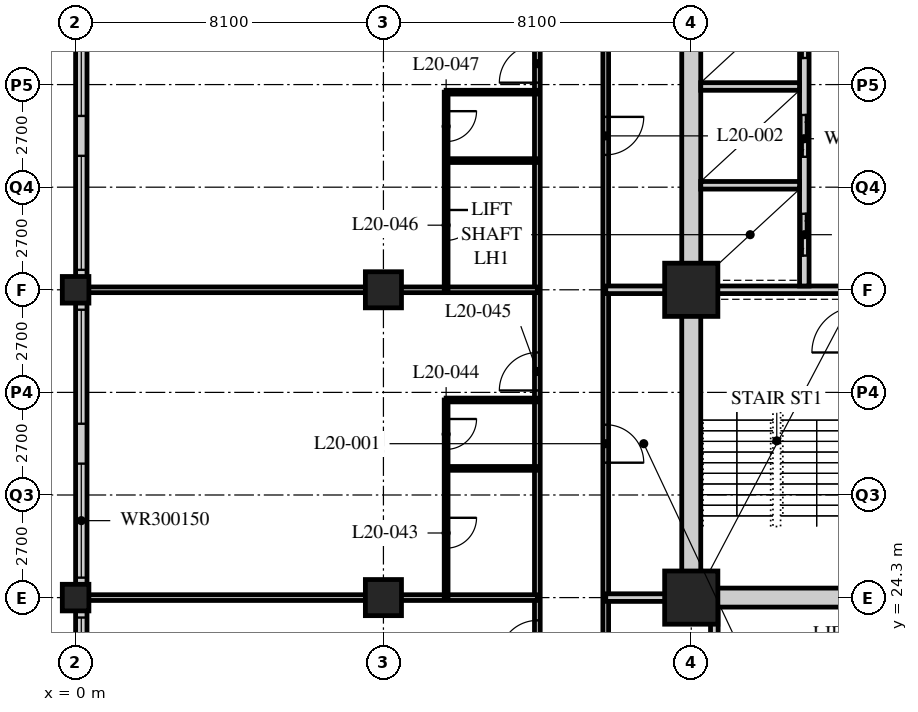
"""IFC4 building model, lengths in metres.
Left out: names, types, materials, properties, quantities, classifications, styles, units other than length and angle.
Written with IfcOpenShell. Run it as: python <this file> out.ifc"""

import sys

from ifc_helpers import new_model, si_unit, direction, frame, frame_2d, origin, origin_2d, place, context, subcontext, project, spatial, rectangle, hollow_rectangle, extrude, element, fill, save


model = new_model("IFC4")
c1 = context("Model", 3, precision=1e-05, world=origin(), true_north=direction((0.0, 1.0)))
c2 = subcontext(c1, "Body", "Model", "MODEL_VIEW")
j1 = project(units=[si_unit("LENGTHUNIT", "METRE"), si_unit("PLANEANGLEUNIT", "RADIAN")], contexts=[c1])
p1 = place(None, origin())
s1 = spatial("IfcSite", under=j1, at=p1, CompositionType="ELEMENT")
p2 = place(p1, origin())
s2 = spatial("IfcBuilding", under=s1, at=p2, CompositionType="ELEMENT")
p3 = place(p2, frame((0.0, 0.0, 80.6)))
s3 = spatial("IfcBuildingStorey", under=s2, at=p3, CompositionType="ELEMENT", Elevation=80.6)
for number, where, z_axis, x_axis in (
    (1, (0.0, 24.3, 0.0), (0.0, 0.0, 1.0), (1.0, 0.0, 0.0)),
    (2, (0.0, 32.4, 0.0), (0.0, 0.0, 1.0), (1.0, 0.0, 0.0)),
):
    element("IfcColumn", number, at=place(p3, frame(where, z_axis=z_axis, x_axis=x_axis)), inside=s3, PredefinedType="COLUMN", context=c2, shape_type="SweptSolid", body=[
        extrude(hollow_rectangle(XDim=0.7, YDim=0.7, WallThickness=0.06, at=origin_2d()), origin(), (0.0, 0.0, 1.0), 3.4),
    ])
for number, where, z_axis, x_axis in (
    (3, (8.1, 24.3, 0.0), (0.0, 0.0, 1.0), (1.0, 0.0, 0.0)),
    (4, (8.1, 32.4, 0.0), (0.0, 0.0, 1.0), (1.0, 0.0, 0.0)),
):
    element("IfcColumn", number, at=place(p3, frame(where, z_axis=z_axis, x_axis=x_axis)), inside=s3, PredefinedType="COLUMN", context=c2, shape_type="SweptSolid", body=[
        extrude(hollow_rectangle(XDim=0.95, YDim=0.95, WallThickness=0.095, at=origin_2d()), origin(), (0.0, 0.0, 1.0), 3.4),
    ])
for number, where, z_axis, x_axis in (
    (5, (16.2, 24.3, 0.0), (0.0, 0.0, 1.0), (1.0, 0.0, 0.0)),
    (6, (16.2, 32.4, 0.0), (0.0, 0.0, 1.0), (1.0, 0.0, 0.0)),
):
    element("IfcColumn", number, at=place(p3, frame(where, z_axis=z_axis, x_axis=x_axis)), inside=s3, PredefinedType="COLUMN", context=c2, shape_type="SweptSolid", body=[
        extrude(hollow_rectangle(XDim=1.4, YDim=1.4, WallThickness=0.12, at=origin_2d()), origin(), (0.0, 0.0, 1.0), 3.4),
    ])
p4 = place(p3, frame((0.15, 40.2, 0.0), z_axis=(0.0, 0.0, 1.0), x_axis=(0.0, -1.0, 0.0)))
e7 = element("IfcWall", 7, at=p4, inside=s3, PredefinedType="SOLIDWALL", context=c2, shape_type="SweptSolid", body=[
    extrude(rectangle(XDim=32.1, YDim=0.3, at=frame_2d((16.05, 0.0))), origin(), (0.0, 0.0, 1.0), 3.19),
])
p5 = place(p4, frame((0.225, 0.0, 0.9)))
e8 = element("IfcOpeningElement", 8, at=p5, cuts=e7, PredefinedType="OPENING", context=c2, shape_type="SweptSolid", body=[
    extrude(rectangle(XDim=3.0, YDim=1.5, at=frame_2d((1.5, 0.75))), frame((0.0, 0.16, 0.0), z_axis=(0.0, -1.0, 0.0), x_axis=(1.0, 0.0, 0.0)), (0.0, 0.0, 1.0), 0.32),
])
p6 = place(p4, frame((4.275, 0.0, 0.9)))
e9 = element("IfcOpeningElement", 9, at=p6, cuts=e7, PredefinedType="OPENING", context=c2, shape_type="SweptSolid", body=[
    extrude(rectangle(XDim=3.0, YDim=1.5, at=frame_2d((1.5, 0.75))), frame((0.0, 0.16, 0.0), z_axis=(0.0, -1.0, 0.0), x_axis=(1.0, 0.0, 0.0)), (0.0, 0.0, 1.0), 0.32),
])
p7 = place(p4, frame((8.325, 0.0, 0.9)))
e10 = element("IfcOpeningElement", 10, at=p7, cuts=e7, PredefinedType="OPENING", context=c2, shape_type="SweptSolid", body=[
    extrude(rectangle(XDim=3.0, YDim=1.5, at=frame_2d((1.5, 0.75))), frame((0.0, 0.16, 0.0), z_axis=(0.0, -1.0, 0.0), x_axis=(1.0, 0.0, 0.0)), (0.0, 0.0, 1.0), 0.32),
])
p8 = place(p4, frame((12.375, 0.0, 0.9)))
e11 = element("IfcOpeningElement", 11, at=p8, cuts=e7, PredefinedType="OPENING", context=c2, shape_type="SweptSolid", body=[
    extrude(rectangle(XDim=3.0, YDim=1.5, at=frame_2d((1.5, 0.75))), frame((0.0, 0.16, 0.0), z_axis=(0.0, -1.0, 0.0), x_axis=(1.0, 0.0, 0.0)), (0.0, 0.0, 1.0), 0.32),
])
p9 = place(p4, frame((16.425, 0.0, 0.9)))
e12 = element("IfcOpeningElement", 12, at=p9, cuts=e7, PredefinedType="OPENING", context=c2, shape_type="SweptSolid", body=[
    extrude(rectangle(XDim=3.0, YDim=1.5, at=frame_2d((1.5, 0.75))), frame((0.0, 0.16, 0.0), z_axis=(0.0, -1.0, 0.0), x_axis=(1.0, 0.0, 0.0)), (0.0, 0.0, 1.0), 0.32),
])
p10 = place(p4, frame((20.475, 0.0, 0.9)))
e13 = element("IfcOpeningElement", 13, at=p10, cuts=e7, PredefinedType="OPENING", context=c2, shape_type="SweptSolid", body=[
    extrude(rectangle(XDim=3.0, YDim=1.5, at=frame_2d((1.5, 0.75))), frame((0.0, 0.16, 0.0), z_axis=(0.0, -1.0, 0.0), x_axis=(1.0, 0.0, 0.0)), (0.0, 0.0, 1.0), 0.32),
])
p11 = place(p4, frame((24.525, 0.0, 0.9)))
e14 = element("IfcOpeningElement", 14, at=p11, cuts=e7, PredefinedType="OPENING", context=c2, shape_type="SweptSolid", body=[
    extrude(rectangle(XDim=3.0, YDim=1.5, at=frame_2d((1.5, 0.75))), frame((0.0, 0.16, 0.0), z_axis=(0.0, -1.0, 0.0), x_axis=(1.0, 0.0, 0.0)), (0.0, 0.0, 1.0), 0.32),
])
p12 = place(p4, frame((28.575, 0.0, 0.9)))
e15 = element("IfcOpeningElement", 15, at=p12, cuts=e7, PredefinedType="OPENING", context=c2, shape_type="SweptSolid", body=[
    extrude(rectangle(XDim=3.0, YDim=1.5, at=frame_2d((1.5, 0.75))), frame((0.0, 0.16, 0.0), z_axis=(0.0, -1.0, 0.0), x_axis=(1.0, 0.0, 0.0)), (0.0, 0.0, 1.0), 0.32),
])
p13 = place(p3, frame((12.15, 16.2, 0.0), z_axis=(0.0, 0.0, 1.0), x_axis=(0.0, 1.0, 0.0)))
e16 = element("IfcWall", 16, at=p13, inside=s3, PredefinedType="PARTITIONING", context=c2, shape_type="SweptSolid", body=[
    extrude(rectangle(XDim=26.1, YDim=0.15, at=frame_2d((13.05, 0.0))), origin(), (0.0, 0.0, 1.0), 3.19),
])
p14 = place(p13, frame((0.3, 0.0, 0.0)))
e17 = element("IfcOpeningElement", 17, at=p14, cuts=e16, PredefinedType="OPENING", context=c2, shape_type="SweptSolid", body=[
    extrude(rectangle(XDim=1.0, YDim=2.1, at=frame_2d((0.5, 1.05))), frame((0.0, 0.085, 0.0), z_axis=(0.0, -1.0, 0.0), x_axis=(1.0, 0.0, 0.0)), (0.0, 0.0, 1.0), 0.17),
])
p15 = place(p13, frame((6.5, 0.0, 0.0)))
e18 = element("IfcOpeningElement", 18, at=p15, cuts=e16, PredefinedType="OPENING", context=c2, shape_type="SweptSolid", body=[
    extrude(rectangle(XDim=1.0, YDim=2.1, at=frame_2d((0.5, 1.05))), frame((0.0, 0.085, 0.0), z_axis=(0.0, -1.0, 0.0), x_axis=(1.0, 0.0, 0.0)), (0.0, 0.0, 1.0), 0.17),
])
p16 = place(p13, frame((13.55, 0.0, 0.0)))
e19 = element("IfcOpeningElement", 19, at=p16, cuts=e16, PredefinedType="OPENING", context=c2, shape_type="SweptSolid", body=[
    extrude(rectangle(XDim=1.0, YDim=2.1, at=frame_2d((0.5, 1.05))), frame((0.0, 0.085, 0.0), z_axis=(0.0, -1.0, 0.0), x_axis=(1.0, 0.0, 0.0)), (0.0, 0.0, 1.0), 0.17),
])
p17 = place(p13, frame((21.65, 0.0, 0.0)))
e20 = element("IfcOpeningElement", 20, at=p17, cuts=e16, PredefinedType="OPENING", context=c2, shape_type="SweptSolid", body=[
    extrude(rectangle(XDim=1.0, YDim=2.1, at=frame_2d((0.5, 1.05))), frame((0.0, 0.085, 0.0), z_axis=(0.0, -1.0, 0.0), x_axis=(1.0, 0.0, 0.0)), (0.0, 0.0, 1.0), 0.17),
])
p18 = place(p3, frame((13.95, 40.5, 0.0), z_axis=(0.0, 0.0, 1.0), x_axis=(0.0, -1.0, 0.0)))
e21 = element("IfcWall", 21, at=p18, inside=s3, PredefinedType="PARTITIONING", context=c2, shape_type="SweptSolid", body=[
    extrude(rectangle(XDim=22.5, YDim=0.15, at=frame_2d((11.25, 0.0))), origin(), (0.0, 0.0, 1.0), 3.19),
])
p19 = place(p18, frame((11.65, 0.0, 0.0)))
e22 = element("IfcOpeningElement", 22, at=p19, cuts=e21, PredefinedType="OPENING", context=c2, shape_type="SweptSolid", body=[
    extrude(rectangle(XDim=1.0, YDim=2.1, at=frame_2d((0.5, 1.05))), frame((0.0, 0.085, 0.0), z_axis=(0.0, -1.0, 0.0), x_axis=(1.0, 0.0, 0.0)), (0.0, 0.0, 1.0), 0.17),
])
p20 = place(p18, frame((3.55, 0.0, 0.0)))
e23 = element("IfcOpeningElement", 23, at=p20, cuts=e21, PredefinedType="OPENING", context=c2, shape_type="SweptSolid", body=[
    extrude(rectangle(XDim=1.0, YDim=2.1, at=frame_2d((0.5, 1.05))), frame((0.0, 0.085, 0.0), z_axis=(0.0, -1.0, 0.0), x_axis=(1.0, 0.0, 0.0)), (0.0, 0.0, 1.0), 0.17),
])
p21 = place(p3, frame((13.95, 32.4, 0.0), z_axis=(0.0, 0.0, 1.0), x_axis=(1.0, 0.0, 0.0)))
e24 = element("IfcWall", 24, at=p21, inside=s3, PredefinedType="SOLIDWALL", context=c2, shape_type="SweptSolid", body=[
    extrude(rectangle(XDim=2.25, YDim=0.2, at=frame_2d((1.125, 0.0))), origin(), (0.0, 0.0, 1.0), 2.428),
])
p22 = place(p3, frame((16.807, 18.0, 0.0), z_axis=(0.0, 0.0, 1.0), x_axis=(0.0, 1.0, 0.0)))
e25 = element("IfcWall", 25, at=p22, inside=s3, PredefinedType="SOLIDWALL", context=c2, shape_type="SweptSolid", body=[
    extrude(rectangle(XDim=6.3, YDim=0.2, at=frame_2d((3.15, 0.0))), origin(), (0.0, 0.0, 1.0), 3.19),
])
p23 = place(p3, frame((13.95, 24.3, 0.0), z_axis=(0.0, 0.0, 1.0), x_axis=(1.0, 0.0, 0.0)))
e26 = element("IfcWall", 26, at=p23, inside=s3, PredefinedType="SOLIDWALL", context=c2, shape_type="SweptSolid", body=[
    extrude(rectangle(XDim=2.25, YDim=0.2, at=frame_2d((1.125, 0.0))), origin(), (0.0, 0.0, 1.0), 2.428),
])
p24 = place(p3, frame((12.15, 24.3, 0.0), z_axis=(0.0, 0.0, 1.0), x_axis=(-1.0, 0.0, 0.0)))
e27 = element("IfcWall", 27, at=p24, inside=s3, PredefinedType="PARTITIONING", context=c2, shape_type="SweptSolid", body=[
    extrude(rectangle(XDim=11.85, YDim=0.15, at=frame_2d((5.925, 0.0))), origin(), (0.0, 0.0, 1.0), 2.428),
])
p25 = place(p3, frame((9.75, 24.3, 0.0), z_axis=(0.0, 0.0, 1.0), x_axis=(0.0, 1.0, 0.0)))
e28 = element("IfcWall", 28, at=p25, inside=s3, PredefinedType="PARTITIONING", context=c2, shape_type="SweptSolid", body=[
    extrude(rectangle(XDim=5.2, YDim=0.1, at=frame_2d((2.6, 0.0))), origin(), (0.0, 0.0, 1.0), 3.19),
])
p26 = place(p25, frame((1.3, 0.0, 0.0)))
e29 = element("IfcOpeningElement", 29, at=p26, cuts=e28, PredefinedType="OPENING", context=c2, shape_type="SweptSolid", body=[
    extrude(rectangle(XDim=0.8, YDim=2.1, at=frame_2d((0.4, 1.05))), frame((0.0, 0.06, 0.0), z_axis=(0.0, -1.0, 0.0), x_axis=(1.0, 0.0, 0.0)), (0.0, 0.0, 1.0), 0.12),
])
p27 = place(p25, frame((3.9, 0.0, 0.0)))
e30 = element("IfcOpeningElement", 30, at=p27, cuts=e28, PredefinedType="OPENING", context=c2, shape_type="SweptSolid", body=[
    extrude(rectangle(XDim=0.8, YDim=2.1, at=frame_2d((0.4, 1.05))), frame((0.0, 0.06, 0.0), z_axis=(0.0, -1.0, 0.0), x_axis=(1.0, 0.0, 0.0)), (0.0, 0.0, 1.0), 0.12),
])
for number, where, z_axis, x_axis in (
    (31, (12.15, 27.7, 0.0), (0.0, 0.0, 1.0), (-1.0, 0.0, 0.0)),
    (32, (12.15, 29.5, 0.0), (0.0, 0.0, 1.0), (-1.0, 0.0, 0.0)),
):
    element("IfcWall", number, at=place(p3, frame(where, z_axis=z_axis, x_axis=x_axis)), inside=s3, PredefinedType="PARTITIONING", context=c2, shape_type="SweptSolid", body=[
        extrude(rectangle(XDim=2.4, YDim=0.1, at=frame_2d((1.2, 0.0))), origin(), (0.0, 0.0, 1.0), 3.19),
    ])
p28 = place(p3, frame((12.15, 32.4, 0.0), z_axis=(0.0, 0.0, 1.0), x_axis=(-1.0, 0.0, 0.0)))
e33 = element("IfcWall", 33, at=p28, inside=s3, PredefinedType="PARTITIONING", context=c2, shape_type="SweptSolid", body=[
    extrude(rectangle(XDim=11.85, YDim=0.15, at=frame_2d((5.925, 0.0))), origin(), (0.0, 0.0, 1.0), 2.428),
])
p29 = place(p3, frame((9.75, 32.4, 0.0), z_axis=(0.0, 0.0, 1.0), x_axis=(0.0, 1.0, 0.0)))
e34 = element("IfcWall", 34, at=p29, inside=s3, PredefinedType="PARTITIONING", context=c2, shape_type="SweptSolid", body=[
    extrude(rectangle(XDim=5.2, YDim=0.1, at=frame_2d((2.6, 0.0))), origin(), (0.0, 0.0, 1.0), 3.19),
])
p30 = place(p29, frame((1.3, 0.0, 0.0)))
e35 = element("IfcOpeningElement", 35, at=p30, cuts=e34, PredefinedType="OPENING", context=c2, shape_type="SweptSolid", body=[
    extrude(rectangle(XDim=0.8, YDim=2.1, at=frame_2d((0.4, 1.05))), frame((0.0, 0.06, 0.0), z_axis=(0.0, -1.0, 0.0), x_axis=(1.0, 0.0, 0.0)), (0.0, 0.0, 1.0), 0.12),
])
p31 = place(p29, frame((3.9, 0.0, 0.0)))
e36 = element("IfcOpeningElement", 36, at=p31, cuts=e34, PredefinedType="OPENING", context=c2, shape_type="SweptSolid", body=[
    extrude(rectangle(XDim=0.8, YDim=2.1, at=frame_2d((0.4, 1.05))), frame((0.0, 0.06, 0.0), z_axis=(0.0, -1.0, 0.0), x_axis=(1.0, 0.0, 0.0)), (0.0, 0.0, 1.0), 0.12),
])
for number, where, z_axis, x_axis in (
    (37, (12.15, 35.8, 0.0), (0.0, 0.0, 1.0), (-1.0, 0.0, 0.0)),
    (38, (12.15, 37.6, 0.0), (0.0, 0.0, 1.0), (-1.0, 0.0, 0.0)),
):
    element("IfcWall", number, at=place(p3, frame(where, z_axis=z_axis, x_axis=x_axis)), inside=s3, PredefinedType="PARTITIONING", context=c2, shape_type="SweptSolid", body=[
        extrude(rectangle(XDim=2.4, YDim=0.1, at=frame_2d((1.2, 0.0))), origin(), (0.0, 0.0, 1.0), 3.19),
    ])
p32 = place(p3, frame((15.95, 24.3, 0.0), z_axis=(0.0, 0.0, 1.0), x_axis=(1.0, 0.0, 0.0)))
e39 = element("IfcWall", 39, at=p32, inside=s3, PredefinedType="SOLIDWALL", context=c2, shape_type="SweptSolid", body=[
    extrude(rectangle(XDim=24.8, YDim=0.5, at=frame_2d((12.4, 0.0))), origin(), (0.0, 0.0, 1.0), 2.428),
])
p33 = place(p32, frame((11.5, 0.0, 0.0)))
e40 = element("IfcOpeningElement", 40, at=p33, cuts=e39, PredefinedType="OPENING", context=c2, shape_type="SweptSolid", body=[
    extrude(rectangle(XDim=1.8, YDim=2.4, at=frame_2d((0.9, 1.2))), frame((0.0, 0.26, 0.0), z_axis=(0.0, -1.0, 0.0), x_axis=(1.0, 0.0, 0.0)), (0.0, 0.0, 1.0), 0.52),
])
p34 = place(p3, frame((16.2, 24.55, 0.0), z_axis=(0.0, 0.0, 1.0), x_axis=(0.0, 1.0, 0.0)))
e41 = element("IfcWall", 41, at=p34, inside=s3, PredefinedType="SOLIDWALL", context=c2, shape_type="SweptSolid", body=[
    extrude(rectangle(XDim=15.7, YDim=0.5, at=frame_2d((7.85, 0.0))), origin(), (0.0, 0.0, 1.0), 2.428),
])
p35 = place(p3, frame((16.45, 32.4, 0.0), z_axis=(0.0, 0.0, 1.0), x_axis=(1.0, 0.0, 0.0)))
e42 = element("IfcWall", 42, at=p35, inside=s3, PredefinedType="SOLIDWALL", context=c2, shape_type="SweptSolid", body=[
    extrude(rectangle(XDim=7.95, YDim=0.2, at=frame_2d((3.975, 0.0))), origin(), (0.0, 0.0, 1.0), 2.578),
])
p36 = place(p3, frame((19.175, 32.5, 0.0), z_axis=(0.0, 0.0, 1.0), x_axis=(0.0, 1.0, 0.0)))
e43 = element("IfcWall", 43, at=p36, inside=s3, PredefinedType="SOLIDWALL", context=c2, shape_type="SweptSolid", body=[
    extrude(rectangle(XDim=7.75, YDim=0.25, at=frame_2d((3.875, 0.0))), origin(), (0.0, 0.0, 1.0), 3.19),
])
p37 = place(p36, frame((0.8, 0.0, 0.0)))
e44 = element("IfcOpeningElement", 44, at=p37, cuts=e43, PredefinedType="OPENING", context=c2, shape_type="SweptSolid", body=[
    extrude(rectangle(XDim=1.1, YDim=2.4, at=frame_2d((0.55, 1.2))), frame((0.0, 0.135, 0.0), z_axis=(0.0, -1.0, 0.0), x_axis=(1.0, 0.0, 0.0)), (0.0, 0.0, 1.0), 0.27),
])
p38 = place(p36, frame((3.4, 0.0, 0.0)))
e45 = element("IfcOpeningElement", 45, at=p38, cuts=e43, PredefinedType="OPENING", context=c2, shape_type="SweptSolid", body=[
    extrude(rectangle(XDim=1.1, YDim=2.4, at=frame_2d((0.55, 1.2))), frame((0.0, 0.135, 0.0), z_axis=(0.0, -1.0, 0.0), x_axis=(1.0, 0.0, 0.0)), (0.0, 0.0, 1.0), 0.27),
])
p39 = place(p36, frame((6.0, 0.0, 0.0)))
e46 = element("IfcOpeningElement", 46, at=p39, cuts=e43, PredefinedType="OPENING", context=c2, shape_type="SweptSolid", body=[
    extrude(rectangle(XDim=1.1, YDim=2.4, at=frame_2d((0.55, 1.2))), frame((0.0, 0.135, 0.0), z_axis=(0.0, -1.0, 0.0), x_axis=(1.0, 0.0, 0.0)), (0.0, 0.0, 1.0), 0.27),
])
for number, where, z_axis, x_axis in (
    (47, (16.45, 35.15, 0.0), (0.0, 0.0, 1.0), (1.0, 0.0, 0.0)),
    (48, (16.45, 37.75, 0.0), (0.0, 0.0, 1.0), (1.0, 0.0, 0.0)),
):
    element("IfcWall", number, at=place(p3, frame(where, z_axis=z_axis, x_axis=x_axis)), inside=s3, PredefinedType="SOLIDWALL", context=c2, shape_type="SweptSolid", body=[
        extrude(rectangle(XDim=2.6, YDim=0.2, at=frame_2d((1.3, 0.0))), origin(), (0.0, 0.0, 1.0), 3.19),
    ])
p40 = place(p5, origin())
e49 = element("IfcWindow", 49, at=p40, inside=s3, PartitioningType="SINGLE_PANEL", PredefinedType="WINDOW", context=c2, shape_type="SweptSolid", body=[
    extrude(rectangle(XDim=3.0, YDim=1.5, at=frame_2d((1.5, 0.75))), frame((0.0, 0.03, 0.0), z_axis=(0.0, -1.0, 0.0), x_axis=(1.0, 0.0, 0.0)), (0.0, 0.0, 1.0), 0.06),
])
fill(e8, e49)
p41 = place(p6, origin())
e50 = element("IfcWindow", 50, at=p41, inside=s3, PartitioningType="SINGLE_PANEL", PredefinedType="WINDOW", context=c2, shape_type="SweptSolid", body=[
    extrude(rectangle(XDim=3.0, YDim=1.5, at=frame_2d((1.5, 0.75))), frame((0.0, 0.03, 0.0), z_axis=(0.0, -1.0, 0.0), x_axis=(1.0, 0.0, 0.0)), (0.0, 0.0, 1.0), 0.06),
])
fill(e9, e50)
p42 = place(p7, origin())
e51 = element("IfcWindow", 51, at=p42, inside=s3, PartitioningType="SINGLE_PANEL", PredefinedType="WINDOW", context=c2, shape_type="SweptSolid", body=[
    extrude(rectangle(XDim=3.0, YDim=1.5, at=frame_2d((1.5, 0.75))), frame((0.0, 0.03, 0.0), z_axis=(0.0, -1.0, 0.0), x_axis=(1.0, 0.0, 0.0)), (0.0, 0.0, 1.0), 0.06),
])
fill(e10, e51)
p43 = place(p8, origin())
e52 = element("IfcWindow", 52, at=p43, inside=s3, PartitioningType="SINGLE_PANEL", PredefinedType="WINDOW", context=c2, shape_type="SweptSolid", body=[
    extrude(rectangle(XDim=3.0, YDim=1.5, at=frame_2d((1.5, 0.75))), frame((0.0, 0.03, 0.0), z_axis=(0.0, -1.0, 0.0), x_axis=(1.0, 0.0, 0.0)), (0.0, 0.0, 1.0), 0.06),
])
fill(e11, e52)
p44 = place(p9, origin())
e53 = element("IfcWindow", 53, at=p44, inside=s3, PartitioningType="SINGLE_PANEL", PredefinedType="WINDOW", context=c2, shape_type="SweptSolid", body=[
    extrude(rectangle(XDim=3.0, YDim=1.5, at=frame_2d((1.5, 0.75))), frame((0.0, 0.03, 0.0), z_axis=(0.0, -1.0, 0.0), x_axis=(1.0, 0.0, 0.0)), (0.0, 0.0, 1.0), 0.06),
])
fill(e12, e53)
p45 = place(p19, origin())
e54 = element("IfcDoor", 54, at=p45, inside=s3, OperationType="SINGLE_SWING_RIGHT", PredefinedType="DOOR", context=c2, shape_type="SweptSolid", body=[
    extrude(rectangle(XDim=1.0, YDim=2.1, at=frame_2d((0.5, 1.05))), frame((0.0, 0.025, 0.0), z_axis=(0.0, -1.0, 0.0), x_axis=(1.0, 0.0, 0.0)), (0.0, 0.0, 1.0), 0.05),
])
fill(e22, e54)
p46 = place(p20, origin())
e55 = element("IfcDoor", 55, at=p46, inside=s3, OperationType="SINGLE_SWING_LEFT", PredefinedType="DOOR", context=c2, shape_type="SweptSolid", body=[
    extrude(rectangle(XDim=1.0, YDim=2.1, at=frame_2d((0.5, 1.05))), frame((0.0, 0.025, 0.0), z_axis=(0.0, -1.0, 0.0), x_axis=(1.0, 0.0, 0.0)), (0.0, 0.0, 1.0), 0.05),
])
fill(e23, e55)
p47 = place(p15, origin())
e56 = element("IfcDoor", 56, at=p47, inside=s3, OperationType="SINGLE_SWING_LEFT", PredefinedType="DOOR", context=c2, shape_type="SweptSolid", body=[
    extrude(rectangle(XDim=1.0, YDim=2.1, at=frame_2d((0.5, 1.05))), frame((0.0, 0.025, 0.0), z_axis=(0.0, -1.0, 0.0), x_axis=(1.0, 0.0, 0.0)), (0.0, 0.0, 1.0), 0.05),
])
fill(e18, e56)
p48 = place(p26, origin())
e57 = element("IfcDoor", 57, at=p48, inside=s3, OperationType="SINGLE_SWING_LEFT", PredefinedType="DOOR", context=c2, shape_type="SweptSolid", body=[
    extrude(rectangle(XDim=0.8, YDim=2.1, at=frame_2d((0.4, 1.05))), frame((0.0, 0.025, 0.0), z_axis=(0.0, -1.0, 0.0), x_axis=(1.0, 0.0, 0.0)), (0.0, 0.0, 1.0), 0.05),
])
fill(e29, e57)
p49 = place(p27, origin())
e58 = element("IfcDoor", 58, at=p49, inside=s3, OperationType="SINGLE_SWING_LEFT", PredefinedType="DOOR", context=c2, shape_type="SweptSolid", body=[
    extrude(rectangle(XDim=0.8, YDim=2.1, at=frame_2d((0.4, 1.05))), frame((0.0, 0.025, 0.0), z_axis=(0.0, -1.0, 0.0), x_axis=(1.0, 0.0, 0.0)), (0.0, 0.0, 1.0), 0.05),
])
fill(e30, e58)
p50 = place(p16, origin())
e59 = element("IfcDoor", 59, at=p50, inside=s3, OperationType="SINGLE_SWING_LEFT", PredefinedType="DOOR", context=c2, shape_type="SweptSolid", body=[
    extrude(rectangle(XDim=1.0, YDim=2.1, at=frame_2d((0.5, 1.05))), frame((0.0, 0.025, 0.0), z_axis=(0.0, -1.0, 0.0), x_axis=(1.0, 0.0, 0.0)), (0.0, 0.0, 1.0), 0.05),
])
fill(e19, e59)
p51 = place(p30, origin())
e60 = element("IfcDoor", 60, at=p51, inside=s3, OperationType="SINGLE_SWING_LEFT", PredefinedType="DOOR", context=c2, shape_type="SweptSolid", body=[
    extrude(rectangle(XDim=0.8, YDim=2.1, at=frame_2d((0.4, 1.05))), frame((0.0, 0.025, 0.0), z_axis=(0.0, -1.0, 0.0), x_axis=(1.0, 0.0, 0.0)), (0.0, 0.0, 1.0), 0.05),
])
fill(e35, e60)
p52 = place(p31, origin())
e61 = element("IfcDoor", 61, at=p52, inside=s3, OperationType="SINGLE_SWING_LEFT", PredefinedType="DOOR", context=c2, shape_type="SweptSolid", body=[
    extrude(rectangle(XDim=0.8, YDim=2.1, at=frame_2d((0.4, 1.05))), frame((0.0, 0.025, 0.0), z_axis=(0.0, -1.0, 0.0), x_axis=(1.0, 0.0, 0.0)), (0.0, 0.0, 1.0), 0.05),
])
fill(e36, e61)
p53 = place(p17, origin())
e62 = element("IfcDoor", 62, at=p53, inside=s3, OperationType="SINGLE_SWING_LEFT", PredefinedType="DOOR", context=c2, shape_type="SweptSolid", body=[
    extrude(rectangle(XDim=1.0, YDim=2.1, at=frame_2d((0.5, 1.05))), frame((0.0, 0.025, 0.0), z_axis=(0.0, -1.0, 0.0), x_axis=(1.0, 0.0, 0.0)), (0.0, 0.0, 1.0), 0.05),
])
fill(e20, e62)
p54 = place(p37, origin())
e63 = element("IfcDoor", 63, at=p54, inside=s3, OperationType="DOUBLE_DOOR_SLIDING", PredefinedType="DOOR", context=c2, shape_type="SweptSolid", body=[
    extrude(rectangle(XDim=1.1, YDim=2.4, at=frame_2d((0.55, 1.2))), frame((0.0, 0.025, 0.0), z_axis=(0.0, -1.0, 0.0), x_axis=(1.0, 0.0, 0.0)), (0.0, 0.0, 1.0), 0.05),
])
fill(e44, e63)
p55 = place(p38, origin())
e64 = element("IfcDoor", 64, at=p55, inside=s3, OperationType="DOUBLE_DOOR_SLIDING", PredefinedType="DOOR", context=c2, shape_type="SweptSolid", body=[
    extrude(rectangle(XDim=1.1, YDim=2.4, at=frame_2d((0.55, 1.2))), frame((0.0, 0.025, 0.0), z_axis=(0.0, -1.0, 0.0), x_axis=(1.0, 0.0, 0.0)), (0.0, 0.0, 1.0), 0.05),
])
fill(e45, e64)
p56 = place(p39, origin())
e65 = element("IfcDoor", 65, at=p56, inside=s3, OperationType="DOUBLE_DOOR_SLIDING", PredefinedType="DOOR", context=c2, shape_type="SweptSolid", body=[
    extrude(rectangle(XDim=1.1, YDim=2.4, at=frame_2d((0.55, 1.2))), frame((0.0, 0.025, 0.0), z_axis=(0.0, -1.0, 0.0), x_axis=(1.0, 0.0, 0.0)), (0.0, 0.0, 1.0), 0.05),
])
fill(e46, e65)
save(model, sys.argv[1])
